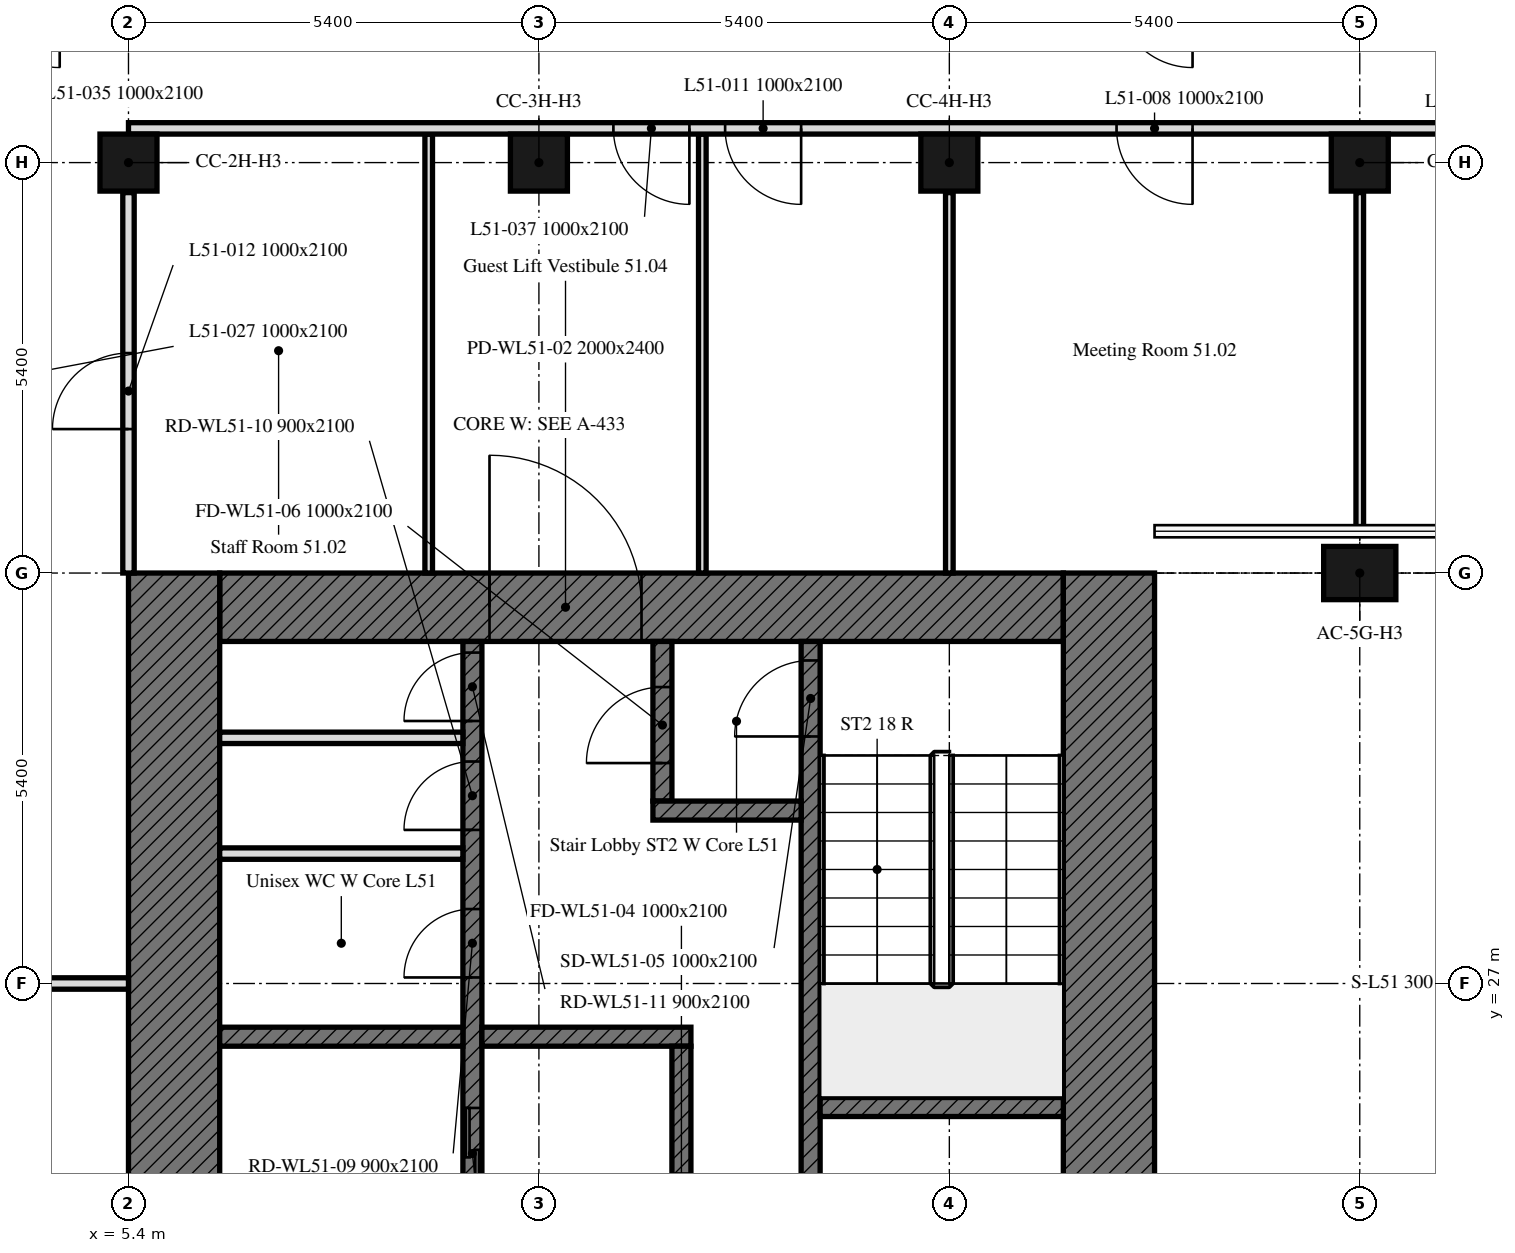
"""IFC4 building model, lengths in metres.
Left out: names, types, materials, properties, quantities, classifications, styles, units other than length and angle.
Written with IfcOpenShell. Run it as: python <this file> out.ifc"""

import sys

from ifc_helpers import new_model, si_unit, direction, frame, frame_2d, origin, origin_2d, place, context, subcontext, project, spatial, rectangle, extrude, element, fill, save


model = new_model("IFC4")
c1 = context("Model", 3, precision=1e-05, world=origin(), true_north=direction((0.0, 1.0)))
c2 = subcontext(c1, "Body", "Model", "MODEL_VIEW")
j1 = project(units=[si_unit("LENGTHUNIT", "METRE"), si_unit("PLANEANGLEUNIT", "RADIAN")], contexts=[c1])
p1 = place(None, origin())
s1 = spatial("IfcSite", under=j1, at=p1, CompositionType="ELEMENT")
p2 = place(p1, origin())
s2 = spatial("IfcBuilding", under=s1, at=p2, CompositionType="ELEMENT")
p3 = place(p2, frame((0.0, 0.0, 207.1)))
s3 = spatial("IfcBuildingStorey", under=s2, at=p3, CompositionType="ELEMENT", Elevation=207.1)
p4 = place(p3, frame((21.6, 32.4, 0.0), z_axis=(0.0, 0.0, 1.0), x_axis=(1.0, 0.0, 0.0)))
e1 = element("IfcColumn", 1, at=p4, inside=s3, PredefinedType="COLUMN", context=c2, shape_type="SweptSolid", body=[
    extrude(rectangle(XDim=0.95, YDim=0.7, at=origin_2d()), origin(), (0.0, 0.0, 1.0), 3.0),
])
for number, where, z_axis, x_axis in (
    (2, (5.4, 37.8, 0.0), (0.0, 0.0, 1.0), (1.0, 0.0, 0.0)),
    (3, (10.8, 37.8, 0.0), (0.0, 0.0, 1.0), (1.0, 0.0, 0.0)),
    (4, (16.2, 37.8, 0.0), (0.0, 0.0, 1.0), (1.0, 0.0, 0.0)),
    (5, (21.6, 37.8, 0.0), (0.0, 0.0, 1.0), (1.0, 0.0, 0.0)),
):
    element("IfcColumn", number, at=place(p3, frame(where, z_axis=z_axis, x_axis=x_axis)), inside=s3, PredefinedType="COLUMN", context=c2, shape_type="SweptSolid", body=[
        extrude(rectangle(XDim=0.75, YDim=0.75, at=origin_2d()), origin(), (0.0, 0.0, 1.0), 3.0),
    ])
p5 = place(p3, frame((6.6, 31.95, 0.0), z_axis=(0.0, 0.0, 1.0), x_axis=(1.0, 0.0, 0.0)))
e6 = element("IfcWall", 6, at=p5, inside=s3, PredefinedType="SOLIDWALL", context=c2, shape_type="SweptSolid", body=[
    extrude(rectangle(XDim=11.1, YDim=0.9, at=frame_2d((5.55, 0.0))), origin(), (0.0, 0.0, 1.0), 3.0),
])
p6 = place(p5, frame((3.55, 0.0, 0.0)))
e7 = element("IfcOpeningElement", 7, at=p6, cuts=e6, PredefinedType="OPENING", context=c2, shape_type="SweptSolid", body=[
    extrude(rectangle(XDim=2.0, YDim=2.4, at=frame_2d((1.0, 1.2))), frame((0.0, 0.45, 0.0), z_axis=(0.0, -1.0, 0.0), x_axis=(1.0, 0.0, 0.0)), (0.0, 0.0, 1.0), 0.9),
])
for number, where, z_axis, x_axis in (
    (8, (6.0, 16.2, 0.0), (0.0, 0.0, 1.0), (0.0, 1.0, 0.0)),
    (9, (18.3, 32.4, 0.0), (0.0, 0.0, 1.0), (0.0, -1.0, 0.0)),
):
    element("IfcWall", number, at=place(p3, frame(where, z_axis=z_axis, x_axis=x_axis)), inside=s3, PredefinedType="SOLIDWALL", context=c2, shape_type="SweptSolid", body=[
        extrude(rectangle(XDim=16.2, YDim=1.2, at=frame_2d((8.1, 0.0))), origin(), (0.0, 0.0, 1.0), 3.0),
    ])
p7 = place(p3, frame((9.925, 17.1, 0.0), z_axis=(0.0, 0.0, 1.0), x_axis=(0.0, 1.0, 0.0)))
e10 = element("IfcWall", 10, at=p7, inside=s3, PredefinedType="SOLIDWALL", context=c2, shape_type="SweptSolid", body=[
    extrude(rectangle(XDim=14.4, YDim=0.25, at=frame_2d((7.2, 0.0))), origin(), (0.0, 0.0, 1.0), 3.0),
])
p8 = place(p7, frame((4.6, 0.0, 0.0)))
e11 = element("IfcOpeningElement", 11, at=p8, cuts=e10, PredefinedType="OPENING", context=c2, shape_type="SweptSolid", body=[
    extrude(rectangle(XDim=1.0, YDim=2.1, at=frame_2d((0.5, 1.05))), frame((0.0, 0.125, 0.0), z_axis=(0.0, -1.0, 0.0), x_axis=(1.0, 0.0, 0.0)), (0.0, 0.0, 1.0), 0.25),
])
p9 = place(p7, frame((7.062, 0.0, 0.0)))
e12 = element("IfcOpeningElement", 12, at=p9, cuts=e10, PredefinedType="OPENING", context=c2, shape_type="SweptSolid", body=[
    extrude(rectangle(XDim=1.2, YDim=2.1, at=frame_2d((0.6, 1.05))), frame((0.0, 0.125, 0.0), z_axis=(0.0, -1.0, 0.0), x_axis=(1.0, 0.0, 0.0)), (0.0, 0.0, 1.0), 0.25),
])
p10 = place(p7, frame((9.979, 0.0, 0.0)))
e13 = element("IfcOpeningElement", 13, at=p10, cuts=e10, PredefinedType="OPENING", context=c2, shape_type="SweptSolid", body=[
    extrude(rectangle(XDim=0.9, YDim=2.1, at=frame_2d((0.45, 1.05))), frame((0.0, 0.125, 0.0), z_axis=(0.0, -1.0, 0.0), x_axis=(1.0, 0.0, 0.0)), (0.0, 0.0, 1.0), 0.25),
])
p11 = place(p7, frame((11.92, 0.0, 0.0)))
e14 = element("IfcOpeningElement", 14, at=p11, cuts=e10, PredefinedType="OPENING", context=c2, shape_type="SweptSolid", body=[
    extrude(rectangle(XDim=0.9, YDim=2.1, at=frame_2d((0.45, 1.05))), frame((0.0, 0.125, 0.0), z_axis=(0.0, -1.0, 0.0), x_axis=(1.0, 0.0, 0.0)), (0.0, 0.0, 1.0), 0.25),
])
p12 = place(p7, frame((13.354, 0.0, 0.0)))
e15 = element("IfcOpeningElement", 15, at=p12, cuts=e10, PredefinedType="OPENING", context=c2, shape_type="SweptSolid", body=[
    extrude(rectangle(XDim=0.9, YDim=2.1, at=frame_2d((0.45, 1.05))), frame((0.0, 0.125, 0.0), z_axis=(0.0, -1.0, 0.0), x_axis=(1.0, 0.0, 0.0)), (0.0, 0.0, 1.0), 0.25),
])
p13 = place(p3, frame((14.375, 17.1, 0.0), z_axis=(0.0, 0.0, 1.0), x_axis=(0.0, 1.0, 0.0)))
e16 = element("IfcWall", 16, at=p13, inside=s3, PredefinedType="SOLIDWALL", context=c2, shape_type="SweptSolid", body=[
    extrude(rectangle(XDim=14.4, YDim=0.25, at=frame_2d((7.2, 0.0))), origin(), (0.0, 0.0, 1.0), 3.0),
])
p14 = place(p13, frame((13.15, 0.0, 0.0)))
e17 = element("IfcOpeningElement", 17, at=p14, cuts=e16, PredefinedType="OPENING", context=c2, shape_type="SweptSolid", body=[
    extrude(rectangle(XDim=1.0, YDim=2.1, at=frame_2d((0.5, 1.05))), frame((0.0, 0.125, 0.0), z_axis=(0.0, -1.0, 0.0), x_axis=(1.0, 0.0, 0.0)), (0.0, 0.0, 1.0), 0.25),
])
p15 = place(p13, frame((0.6, 0.0, 0.0)))
e18 = element("IfcOpeningElement", 18, at=p15, cuts=e16, PredefinedType="OPENING", context=c2, shape_type="SweptSolid", body=[
    extrude(rectangle(XDim=1.1, YDim=2.1, at=frame_2d((0.55, 1.05))), frame((0.0, 0.125, 0.0), z_axis=(0.0, -1.0, 0.0), x_axis=(1.0, 0.0, 0.0)), (0.0, 0.0, 1.0), 0.25),
])
p16 = place(p13, frame((3.25, 0.0, 0.0)))
e19 = element("IfcOpeningElement", 19, at=p16, cuts=e16, PredefinedType="OPENING", context=c2, shape_type="SweptSolid", body=[
    extrude(rectangle(XDim=0.9, YDim=2.1, at=frame_2d((0.45, 1.05))), frame((0.0, 0.125, 0.0), z_axis=(0.0, -1.0, 0.0), x_axis=(1.0, 0.0, 0.0)), (0.0, 0.0, 1.0), 0.25),
])
for number, where, z_axis, x_axis in (
    (20, (14.5, 25.375, 0.0), (0.0, 0.0, 1.0), (1.0, 0.0, 0.0)),
    (21, (6.6, 26.3, 0.0), (0.0, 0.0, 1.0), (1.0, 0.0, 0.0)),
):
    element("IfcWall", number, at=place(p3, frame(where, z_axis=z_axis, x_axis=x_axis)), inside=s3, PredefinedType="SOLIDWALL", context=c2, shape_type="SweptSolid", body=[
        extrude(rectangle(XDim=3.2, YDim=0.25, at=frame_2d((1.6, 0.0))), origin(), (0.0, 0.0, 1.0), 3.0),
    ])
p17 = place(p3, frame((10.05, 26.3, 0.0), z_axis=(0.0, 0.0, 1.0), x_axis=(1.0, 0.0, 0.0)))
e22 = element("IfcWall", 22, at=p17, inside=s3, PredefinedType="SOLIDWALL", context=c2, shape_type="SweptSolid", body=[
    extrude(rectangle(XDim=2.75, YDim=0.25, at=frame_2d((1.375, 0.0))), origin(), (0.0, 0.0, 1.0), 3.0),
])
p18 = place(p3, frame((12.425, 29.4, 0.0), z_axis=(0.0, 0.0, 1.0), x_axis=(0.0, 1.0, 0.0)))
e23 = element("IfcWall", 23, at=p18, inside=s3, PredefinedType="SOLIDWALL", context=c2, shape_type="SweptSolid", body=[
    extrude(rectangle(XDim=2.1, YDim=0.25, at=frame_2d((1.05, 0.0))), origin(), (0.0, 0.0, 1.0), 3.0),
])
p19 = place(p18, frame((0.5, 0.0, 0.0)))
e24 = element("IfcOpeningElement", 24, at=p19, cuts=e23, PredefinedType="OPENING", context=c2, shape_type="SweptSolid", body=[
    extrude(rectangle(XDim=1.0, YDim=2.1, at=frame_2d((0.5, 1.05))), frame((0.0, 0.125, 0.0), z_axis=(0.0, -1.0, 0.0), x_axis=(1.0, 0.0, 0.0)), (0.0, 0.0, 1.0), 0.25),
])
p20 = place(p3, frame((12.3, 29.275, 0.0), z_axis=(0.0, 0.0, 1.0), x_axis=(1.0, 0.0, 0.0)))
e25 = element("IfcWall", 25, at=p20, inside=s3, PredefinedType="SOLIDWALL", context=c2, shape_type="SweptSolid", body=[
    extrude(rectangle(XDim=1.95, YDim=0.25, at=frame_2d((0.975, 0.0))), origin(), (0.0, 0.0, 1.0), 3.0),
])
p21 = place(p3, frame((12.675, 20.55, 0.0), z_axis=(0.0, 0.0, 1.0), x_axis=(0.0, 1.0, 0.0)))
e26 = element("IfcWall", 26, at=p21, inside=s3, PredefinedType="SOLIDWALL", context=c2, shape_type="SweptSolid", body=[
    extrude(rectangle(XDim=5.625, YDim=0.25, at=frame_2d((2.812, 0.0))), origin(), (0.0, 0.0, 1.0), 3.0),
])
p22 = place(p21, frame((2.95, 0.0, 0.0)))
e27 = element("IfcOpeningElement", 27, at=p22, cuts=e26, PredefinedType="OPENING", context=c2, shape_type="SweptSolid", body=[
    extrude(rectangle(XDim=1.0, YDim=2.1, at=frame_2d((0.5, 1.05))), frame((0.0, 0.125, 0.0), z_axis=(0.0, -1.0, 0.0), x_axis=(1.0, 0.0, 0.0)), (0.0, 0.0, 1.0), 0.25),
])
for number, where, z_axis, x_axis in (
    (28, (6.6, 28.709, 0.0), (0.0, 0.0, 1.0), (1.0, 0.0, 0.0)),
    (29, (6.6, 30.232, 0.0), (0.0, 0.0, 1.0), (1.0, 0.0, 0.0)),
):
    element("IfcWall", number, at=place(p3, frame(where, z_axis=z_axis, x_axis=x_axis)), inside=s3, PredefinedType="PARTITIONING", context=c2, shape_type="SweptSolid", body=[
        extrude(rectangle(XDim=3.2, YDim=0.15, at=frame_2d((1.6, 0.0))), origin(), (0.0, 0.0, 1.0), 3.0),
    ])
p23 = place(p3, frame((21.6, 37.405, 0.0), z_axis=(0.0, 0.0, 1.0), x_axis=(0.0, -1.0, 0.0)))
e30 = element("IfcWall", 30, at=p23, inside=s3, PredefinedType="PARTITIONING", context=c2, shape_type="SweptSolid", body=[
    extrude(rectangle(XDim=4.51, YDim=0.1, at=frame_2d((2.255, 0.0))), origin(), (0.0, 0.0, 1.0), 2.4),
])
p24 = place(p3, frame((16.2, 37.405, 0.0), z_axis=(0.0, 0.0, 1.0), x_axis=(0.0, -1.0, 0.0)))
e31 = element("IfcWall", 31, at=p24, inside=s3, PredefinedType="PARTITIONING", context=c2, shape_type="SweptSolid", body=[
    extrude(rectangle(XDim=5.005, YDim=0.1, at=frame_2d((2.502, 0.0))), origin(), (0.0, 0.0, 1.0), 2.4),
])
for number, where, z_axis, x_axis in (
    (32, (12.95, 32.4, 0.0), (0.0, 0.0, 1.0), (0.0, 1.0, 0.0)),
    (33, (9.35, 38.175, 0.0), (0.0, 0.0, 1.0), (0.0, -1.0, 0.0)),
):
    element("IfcWall", number, at=place(p3, frame(where, z_axis=z_axis, x_axis=x_axis)), inside=s3, PredefinedType="PARTITIONING", context=c2, shape_type="SweptSolid", body=[
        extrude(rectangle(XDim=5.775, YDim=0.1, at=frame_2d((2.888, 0.0))), origin(), (0.0, 0.0, 1.0), 2.4),
    ])
p25 = place(p3, frame((0.751, 27.0, 0.0), z_axis=(0.0, 0.0, 1.0), x_axis=(1.0, 0.0, 0.0)))
e34 = element("IfcWall", 34, at=p25, inside=s3, PredefinedType="PARTITIONING", context=c2, shape_type="SweptSolid", body=[
    extrude(rectangle(XDim=4.649, YDim=0.15, at=frame_2d((2.324, 0.0))), origin(), (0.0, 0.0, 1.0), 2.4),
])
p26 = place(p3, frame((5.4, 32.4, 0.0), z_axis=(0.0, 0.0, 1.0), x_axis=(0.0, 1.0, 0.0)))
e35 = element("IfcWall", 35, at=p26, inside=s3, PredefinedType="PARTITIONING", context=c2, shape_type="SweptSolid", body=[
    extrude(rectangle(XDim=5.005, YDim=0.15, at=frame_2d((2.502, 0.0))), origin(), (0.0, 0.0, 1.0), 3.0),
])
p27 = place(p26, frame((1.894, 0.0, 0.0)))
e36 = element("IfcOpeningElement", 36, at=p27, cuts=e35, PredefinedType="OPENING", context=c2, shape_type="SweptSolid", body=[
    extrude(rectangle(XDim=1.0, YDim=2.1, at=frame_2d((0.5, 1.05))), frame((0.0, 0.075, 0.0), z_axis=(0.0, -1.0, 0.0), x_axis=(1.0, 0.0, 0.0)), (0.0, 0.0, 1.0), 0.15),
])
p28 = place(p3, frame((42.449, 38.25, 0.0), z_axis=(0.0, 0.0, 1.0), x_axis=(-1.0, 0.0, 0.0)))
e37 = element("IfcWall", 37, at=p28, inside=s3, PredefinedType="PARTITIONING", context=c2, shape_type="SweptSolid", body=[
    extrude(rectangle(XDim=37.049, YDim=0.15, at=frame_2d((18.524, 0.0))), origin(), (0.0, 0.0, 1.0), 2.4),
])
p29 = place(p28, frame((12.266, 0.0, 0.0)))
e38 = element("IfcOpeningElement", 38, at=p29, cuts=e37, PredefinedType="OPENING", context=c2, shape_type="SweptSolid", body=[
    extrude(rectangle(XDim=1.0, YDim=2.1, at=frame_2d((0.5, 1.05))), frame((0.0, 0.075, 0.0), z_axis=(0.0, -1.0, 0.0), x_axis=(1.0, 0.0, 0.0)), (0.0, 0.0, 1.0), 0.15),
])
p30 = place(p28, frame((23.049, 0.0, 0.0)))
e39 = element("IfcOpeningElement", 39, at=p30, cuts=e37, PredefinedType="OPENING", context=c2, shape_type="SweptSolid", body=[
    extrude(rectangle(XDim=1.0, YDim=2.1, at=frame_2d((0.5, 1.05))), frame((0.0, 0.075, 0.0), z_axis=(0.0, -1.0, 0.0), x_axis=(1.0, 0.0, 0.0)), (0.0, 0.0, 1.0), 0.15),
])
p31 = place(p28, frame((1.409, 0.0, 0.0)))
e40 = element("IfcOpeningElement", 40, at=p31, cuts=e37, PredefinedType="OPENING", context=c2, shape_type="SweptSolid", body=[
    extrude(rectangle(XDim=1.0, YDim=2.1, at=frame_2d((0.5, 1.05))), frame((0.0, 0.075, 0.0), z_axis=(0.0, -1.0, 0.0), x_axis=(1.0, 0.0, 0.0)), (0.0, 0.0, 1.0), 0.15),
])
p32 = place(p28, frame((28.199, 0.0, 0.0)))
e41 = element("IfcOpeningElement", 41, at=p32, cuts=e37, PredefinedType="OPENING", context=c2, shape_type="SweptSolid", body=[
    extrude(rectangle(XDim=1.0, YDim=2.1, at=frame_2d((0.5, 1.05))), frame((0.0, 0.075, 0.0), z_axis=(0.0, -1.0, 0.0), x_axis=(1.0, 0.0, 0.0)), (0.0, 0.0, 1.0), 0.15),
])
p33 = place(p28, frame((7.099, 0.0, 0.0)))
e42 = element("IfcOpeningElement", 42, at=p33, cuts=e37, PredefinedType="OPENING", context=c2, shape_type="SweptSolid", body=[
    extrude(rectangle(XDim=1.0, YDim=2.1, at=frame_2d((0.5, 1.05))), frame((0.0, 0.075, 0.0), z_axis=(0.0, -1.0, 0.0), x_axis=(1.0, 0.0, 0.0)), (0.0, 0.0, 1.0), 0.15),
])
p34 = place(p28, frame((5.629, 0.0, 0.0)))
e43 = element("IfcOpeningElement", 43, at=p34, cuts=e37, PredefinedType="OPENING", context=c2, shape_type="SweptSolid", body=[
    extrude(rectangle(XDim=1.0, YDim=2.1, at=frame_2d((0.5, 1.05))), frame((0.0, 0.075, 0.0), z_axis=(0.0, -1.0, 0.0), x_axis=(1.0, 0.0, 0.0)), (0.0, 0.0, 1.0), 0.15),
])
p35 = place(p28, frame((29.669, 0.0, 0.0)))
e44 = element("IfcOpeningElement", 44, at=p35, cuts=e37, PredefinedType="OPENING", context=c2, shape_type="SweptSolid", body=[
    extrude(rectangle(XDim=1.0, YDim=2.1, at=frame_2d((0.5, 1.05))), frame((0.0, 0.075, 0.0), z_axis=(0.0, -1.0, 0.0), x_axis=(1.0, 0.0, 0.0)), (0.0, 0.0, 1.0), 0.15),
])
p36 = place(p6, origin())
e45 = element("IfcDoor", 45, at=p36, inside=s3, OperationType="DOUBLE_DOOR_SINGLE_SWING", PredefinedType="DOOR", context=c2, shape_type="SweptSolid", body=[
    extrude(rectangle(XDim=2.0, YDim=2.4, at=frame_2d((1.0, 1.2))), frame((0.0, 0.025, 0.0), z_axis=(0.0, -1.0, 0.0), x_axis=(1.0, 0.0, 0.0)), (0.0, 0.0, 1.0), 0.05),
])
fill(e7, e45)
p37 = place(p14, origin())
e46 = element("IfcDoor", 46, at=p37, inside=s3, OperationType="SINGLE_SWING_LEFT", PredefinedType="DOOR", context=c2, shape_type="SweptSolid", body=[
    extrude(rectangle(XDim=1.0, YDim=2.1, at=frame_2d((0.5, 1.05))), frame((0.0, 0.025, 0.0), z_axis=(0.0, -1.0, 0.0), x_axis=(1.0, 0.0, 0.0)), (0.0, 0.0, 1.0), 0.05),
])
fill(e17, e46)
p38 = place(p19, origin())
e47 = element("IfcDoor", 47, at=p38, inside=s3, OperationType="SINGLE_SWING_LEFT", PredefinedType="DOOR", context=c2, shape_type="SweptSolid", body=[
    extrude(rectangle(XDim=1.0, YDim=2.1, at=frame_2d((0.5, 1.05))), frame((0.0, 0.025, 0.0), z_axis=(0.0, -1.0, 0.0), x_axis=(1.0, 0.0, 0.0)), (0.0, 0.0, 1.0), 0.05),
])
fill(e24, e47)
p39 = place(p9, origin())
e48 = element("IfcDoor", 48, at=p39, inside=s3, OperationType="DOUBLE_DOOR_SLIDING", PredefinedType="DOOR", context=c2, shape_type="SweptSolid", body=[
    extrude(rectangle(XDim=1.2, YDim=2.1, at=frame_2d((0.6, 1.05))), frame((0.0, 0.025, 0.0), z_axis=(0.0, -1.0, 0.0), x_axis=(1.0, 0.0, 0.0)), (0.0, 0.0, 1.0), 0.05),
])
fill(e12, e48)
p40 = place(p10, origin())
e49 = element("IfcDoor", 49, at=p40, inside=s3, OperationType="SINGLE_SWING_LEFT", PredefinedType="DOOR", context=c2, shape_type="SweptSolid", body=[
    extrude(rectangle(XDim=0.9, YDim=2.1, at=frame_2d((0.45, 1.05))), frame((0.0, 0.025, 0.0), z_axis=(0.0, -1.0, 0.0), x_axis=(1.0, 0.0, 0.0)), (0.0, 0.0, 1.0), 0.05),
])
fill(e13, e49)
p41 = place(p11, origin())
e50 = element("IfcDoor", 50, at=p41, inside=s3, OperationType="SINGLE_SWING_LEFT", PredefinedType="DOOR", context=c2, shape_type="SweptSolid", body=[
    extrude(rectangle(XDim=0.9, YDim=2.1, at=frame_2d((0.45, 1.05))), frame((0.0, 0.025, 0.0), z_axis=(0.0, -1.0, 0.0), x_axis=(1.0, 0.0, 0.0)), (0.0, 0.0, 1.0), 0.05),
])
fill(e14, e50)
p42 = place(p12, origin())
e51 = element("IfcDoor", 51, at=p42, inside=s3, OperationType="SINGLE_SWING_LEFT", PredefinedType="DOOR", context=c2, shape_type="SweptSolid", body=[
    extrude(rectangle(XDim=0.9, YDim=2.1, at=frame_2d((0.45, 1.05))), frame((0.0, 0.025, 0.0), z_axis=(0.0, -1.0, 0.0), x_axis=(1.0, 0.0, 0.0)), (0.0, 0.0, 1.0), 0.05),
])
fill(e15, e51)
p43 = place(p30, origin())
e52 = element("IfcDoor", 52, at=p43, inside=s3, OperationType="SINGLE_SWING_RIGHT", PredefinedType="DOOR", context=c2, shape_type="SweptSolid", body=[
    extrude(rectangle(XDim=1.0, YDim=2.1, at=frame_2d((0.5, 1.05))), frame((0.0, 0.025, 0.0), z_axis=(0.0, -1.0, 0.0), x_axis=(1.0, 0.0, 0.0)), (0.0, 0.0, 1.0), 0.05),
])
fill(e39, e52)
p44 = place(p32, origin())
e53 = element("IfcDoor", 53, at=p44, inside=s3, OperationType="SINGLE_SWING_RIGHT", PredefinedType="DOOR", context=c2, shape_type="SweptSolid", body=[
    extrude(rectangle(XDim=1.0, YDim=2.1, at=frame_2d((0.5, 1.05))), frame((0.0, 0.025, 0.0), z_axis=(0.0, -1.0, 0.0), x_axis=(1.0, 0.0, 0.0)), (0.0, 0.0, 1.0), 0.05),
])
fill(e41, e53)
p45 = place(p27, origin())
e54 = element("IfcDoor", 54, at=p45, inside=s3, OperationType="SINGLE_SWING_LEFT", PredefinedType="DOOR", context=c2, shape_type="SweptSolid", body=[
    extrude(rectangle(XDim=1.0, YDim=2.1, at=frame_2d((0.5, 1.05))), frame((0.0, 0.025, 0.0), z_axis=(0.0, -1.0, 0.0), x_axis=(1.0, 0.0, 0.0)), (0.0, 0.0, 1.0), 0.05),
])
fill(e36, e54)
p46 = place(p35, origin())
e55 = element("IfcDoor", 55, at=p46, inside=s3, OperationType="SINGLE_SWING_RIGHT", PredefinedType="DOOR", context=c2, shape_type="SweptSolid", body=[
    extrude(rectangle(XDim=1.0, YDim=2.1, at=frame_2d((0.5, 1.05))), frame((0.0, 0.025, 0.0), z_axis=(0.0, -1.0, 0.0), x_axis=(1.0, 0.0, 0.0)), (0.0, 0.0, 1.0), 0.05),
])
fill(e44, e55)
save(model, sys.argv[1])
